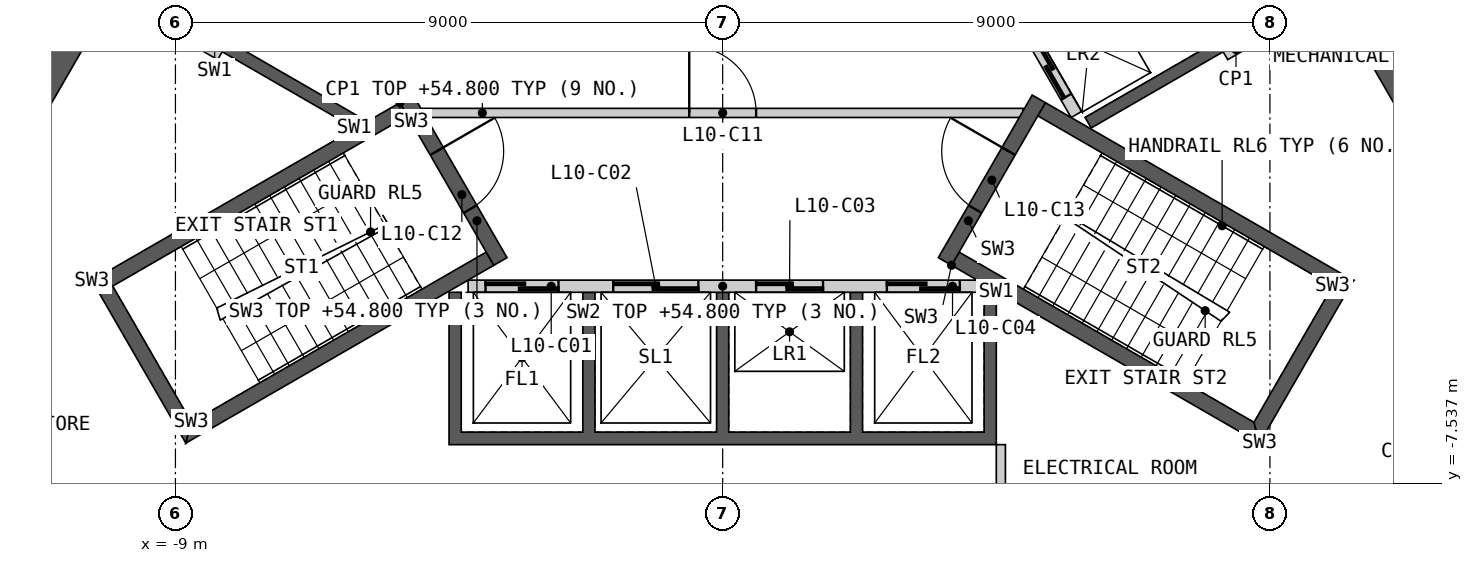
"""IFC4 building model, lengths in metres.
Left out: names, types, materials, properties, quantities, classifications, styles, units other than length and angle.
Written with IfcOpenShell. Run it as: python <this file> out.ifc"""

import sys

from ifc_helpers import new_model, si_unit, direction, frame, frame_2d, origin, place, context, subcontext, project, spatial, polyline, rectangle, outline, extrude, element, fill, save


model = new_model("IFC4")
c1 = context("Model", 3, precision=1e-05, world=origin(), true_north=direction((0.0, 1.0)))
c2 = subcontext(c1, "Body", "Model", "MODEL_VIEW")
j1 = project(units=[si_unit("LENGTHUNIT", "METRE"), si_unit("PLANEANGLEUNIT", "RADIAN")], contexts=[c1])
p1 = place(None, origin())
s1 = spatial("IfcSite", under=j1, at=p1, CompositionType="ELEMENT")
p2 = place(p1, origin())
s2 = spatial("IfcBuilding", under=s1, at=p2, CompositionType="ELEMENT")
p3 = place(p2, frame((0.0, 0.0, 51.0)))
s3 = spatial("IfcBuildingStorey", under=s2, at=p3, CompositionType="ELEMENT", Elevation=51.0)
p4 = place(p3, origin())
e1 = element("IfcWall", 1, at=p4, inside=s3, PredefinedType="SHEAR", context=c2, shape_type="SweptSolid", body=[
    extrude(outline(polyline([(4.5, -4.4), (4.5, -6.906), (-4.5, -6.906), (-4.5, -4.4), (-4.3, -4.4), (-4.3, -6.7), (-2.3, -6.7), (-2.3, -4.4), (-2.1, -4.4), (-2.1, -6.7), (-0.1, -6.7), (-0.1, -4.4), (0.1, -4.4), (0.1, -6.7), (2.1, -6.7), (2.1, -4.4), (2.3, -4.4), (2.3, -6.7), (4.3, -6.7), (4.3, -4.4), (4.5, -4.4)])), origin(), (0.0, 0.0, 1.0), 3.8),
])
p5 = place(p3, frame((-4.187, -4.3, 0.0), z_axis=(0.0, 0.0, 1.0), x_axis=(1.0, 0.0, 0.0)))
e2 = element("IfcWall", 2, at=p5, inside=s3, PredefinedType="SOLIDWALL", context=c2, shape_type="SweptSolid", body=[
    extrude(rectangle(XDim=8.373, YDim=0.2, at=frame_2d((4.187, 0.0))), origin(), (0.0, 0.0, 1.0), 3.8),
])
p6 = place(p5, frame((0.287, 0.0, 0.0)))
e3 = element("IfcOpeningElement", 3, at=p6, cuts=e2, PredefinedType="OPENING", context=c2, shape_type="SweptSolid", body=[
    extrude(rectangle(XDim=1.2, YDim=2.1, at=frame_2d((0.6, 1.05))), frame((0.0, 0.11, 0.0), z_axis=(0.0, -1.0, 0.0), x_axis=(1.0, 0.0, 0.0)), (0.0, 0.0, 1.0), 0.22),
])
p7 = place(p5, frame((2.387, 0.0, 0.0)))
e4 = element("IfcOpeningElement", 4, at=p7, cuts=e2, PredefinedType="OPENING", context=c2, shape_type="SweptSolid", body=[
    extrude(rectangle(XDim=1.4, YDim=2.1, at=frame_2d((0.7, 1.05))), frame((0.0, 0.11, 0.0), z_axis=(0.0, -1.0, 0.0), x_axis=(1.0, 0.0, 0.0)), (0.0, 0.0, 1.0), 0.22),
])
p8 = place(p5, frame((4.737, 0.0, 0.0)))
e5 = element("IfcOpeningElement", 5, at=p8, cuts=e2, PredefinedType="OPENING", context=c2, shape_type="SweptSolid", body=[
    extrude(rectangle(XDim=1.1, YDim=2.1, at=frame_2d((0.55, 1.05))), frame((0.0, 0.11, 0.0), z_axis=(0.0, -1.0, 0.0), x_axis=(1.0, 0.0, 0.0)), (0.0, 0.0, 1.0), 0.22),
])
p9 = place(p5, frame((6.887, 0.0, 0.0)))
e6 = element("IfcOpeningElement", 6, at=p9, cuts=e2, PredefinedType="OPENING", context=c2, shape_type="SweptSolid", body=[
    extrude(rectangle(XDim=1.2, YDim=2.1, at=frame_2d((0.6, 1.05))), frame((0.0, 0.11, 0.0), z_axis=(0.0, -1.0, 0.0), x_axis=(1.0, 0.0, 0.0)), (0.0, 0.0, 1.0), 0.22),
])
p10 = place(p3, origin())
e7 = element("IfcWall", 7, at=p10, inside=s3, PredefinedType="SHEAR", context=c2, shape_type="SweptSolid", body=[
    extrude(outline(polyline([(2.66, 4.192), (4.831, 5.445), (8.231, -0.444), (6.061, -1.697), (5.96, -1.524), (7.952, -0.374), (6.952, 1.358), (4.96, 0.208), (4.861, 0.381), (6.852, 1.531), (5.852, 3.263), (3.861, 2.113), (3.76, 2.287), (5.752, 3.437), (4.752, 5.169), (2.76, 4.019), (2.66, 4.192)])), origin(), (0.0, 0.0, 1.0), 3.8),
])
p11 = place(p3, frame((5.817, -1.476, 0.0), z_axis=(0.0, 0.0, 1.0), x_axis=(-0.500002616675, 0.866023893041, 0.0)))
e8 = element("IfcWall", 8, at=p11, inside=s3, PredefinedType="SOLIDWALL", context=c2, shape_type="SweptSolid", body=[
    extrude(rectangle(XDim=8.373, YDim=0.2, at=frame_2d((4.187, 0.0))), origin(), (0.0, 0.0, 1.0), 3.8),
])
p12 = place(p11, frame((0.337, 0.0, 0.0)))
e9 = element("IfcOpeningElement", 9, at=p12, cuts=e8, PredefinedType="OPENING", context=c2, shape_type="SweptSolid", body=[
    extrude(rectangle(XDim=1.1, YDim=2.1, at=frame_2d((0.55, 1.05))), frame((0.0, 0.11, 0.0), z_axis=(0.0, -1.0, 0.0), x_axis=(1.0, 0.0, 0.0)), (0.0, 0.0, 1.0), 0.22),
])
p13 = place(p11, frame((2.537, 0.0, 0.0)))
e10 = element("IfcOpeningElement", 10, at=p13, cuts=e8, PredefinedType="OPENING", context=c2, shape_type="SweptSolid", body=[
    extrude(rectangle(XDim=1.1, YDim=2.1, at=frame_2d((0.55, 1.05))), frame((0.0, 0.11, 0.0), z_axis=(0.0, -1.0, 0.0), x_axis=(1.0, 0.0, 0.0)), (0.0, 0.0, 1.0), 0.22),
])
p14 = place(p11, frame((4.737, 0.0, 0.0)))
e11 = element("IfcOpeningElement", 11, at=p14, cuts=e8, PredefinedType="OPENING", context=c2, shape_type="SweptSolid", body=[
    extrude(rectangle(XDim=1.1, YDim=2.1, at=frame_2d((0.55, 1.05))), frame((0.0, 0.11, 0.0), z_axis=(0.0, -1.0, 0.0), x_axis=(1.0, 0.0, 0.0)), (0.0, 0.0, 1.0), 0.22),
])
p15 = place(p11, frame((7.037, 0.0, 0.0)))
e12 = element("IfcOpeningElement", 12, at=p15, cuts=e8, PredefinedType="OPENING", context=c2, shape_type="SweptSolid", body=[
    extrude(rectangle(XDim=0.9, YDim=2.1, at=frame_2d((0.45, 1.05))), frame((0.0, 0.11, 0.0), z_axis=(0.0, -1.0, 0.0), x_axis=(1.0, 0.0, 0.0)), (0.0, 0.0, 1.0), 0.22),
])
p16 = place(p3, origin())
e13 = element("IfcWall", 13, at=p16, inside=s3, PredefinedType="SHEAR", context=c2, shape_type="SweptSolid", body=[
    extrude(outline(polyline([(-6.061, -1.697), (-8.231, -0.444), (-8.131, -0.271), (-5.96, -1.524), (-6.061, -1.697)])), origin(), (0.0, 0.0, 1.0), 3.8),
])
p17 = place(p3, frame((-4.941, -1.45, 0.0), z_axis=(0.0, 0.0, 1.0), x_axis=(1.0, 0.0, 0.0)))
e14 = element("IfcWall", 14, at=p17, inside=s3, PredefinedType="PARTITIONING", context=c2, shape_type="SweptSolid", body=[
    extrude(rectangle(XDim=9.882, YDim=0.15, at=frame_2d((4.941, 0.0))), origin(), (0.0, 0.0, 1.0), 3.8),
])
p18 = place(p17, frame((4.391, 0.0, 0.0)))
e15 = element("IfcOpeningElement", 15, at=p18, cuts=e14, PredefinedType="OPENING", context=c2, shape_type="SweptSolid", body=[
    extrude(rectangle(XDim=1.1, YDim=2.1, at=frame_2d((0.55, 1.05))), frame((0.0, 0.085, 0.0), z_axis=(0.0, -1.0, 0.0), x_axis=(1.0, 0.0, 0.0)), (0.0, 0.0, 1.0), 0.17),
])
p19 = place(p3, origin())
e16 = element("IfcWall", 16, at=p19, inside=s3, PredefinedType="SHEAR", context=c2, shape_type="SweptSolid", body=[
    extrude(outline(polyline([(-5.307, -1.281), (-10.374, -4.206), (-10.032, -4.298), (-5.182, -1.498), (-5.307, -1.281)])), origin(), (0.0, 0.0, 1.0), 3.8),
])
p20 = place(p3, origin())
e17 = element("IfcWall", 17, at=p20, inside=s3, PredefinedType="SHEAR", context=c2, shape_type="SweptSolid", body=[
    extrude(outline(polyline([(-10.374, -4.206), (-8.83, -6.881), (-8.738, -6.539), (-10.032, -4.298), (-10.374, -4.206)])), origin(), (0.0, 0.0, 1.0), 3.8),
])
p21 = place(p3, origin())
e18 = element("IfcWall", 18, at=p21, inside=s3, PredefinedType="SHEAR", context=c2, shape_type="SweptSolid", body=[
    extrude(outline(polyline([(-8.738, -6.539), (-8.83, -6.881), (-3.763, -3.956), (-3.888, -3.739), (-8.738, -6.539)])), origin(), (0.0, 0.0, 1.0), 3.8),
])
p22 = place(p3, frame((-5.199, -1.219, 0.0), z_axis=(0.0, 0.0, 1.0), x_axis=(0.499982516597, -0.866035497597, 0.0)))
e19 = element("IfcWall", 19, at=p22, inside=s3, PredefinedType="SHEAR", context=c2, shape_type="SweptSolid", body=[
    extrude(rectangle(XDim=3.088, YDim=0.25, at=frame_2d((1.544, 0.0))), origin(), (0.0, 0.0, 1.0), 3.8),
])
p23 = place(p22, frame((0.994, 0.0, 0.0)))
e20 = element("IfcOpeningElement", 20, at=p23, cuts=e19, PredefinedType="OPENING", context=c2, shape_type="SweptSolid", body=[
    extrude(rectangle(XDim=1.1, YDim=2.1, at=frame_2d((0.55, 1.05))), frame((0.0, 0.135, 0.0), z_axis=(0.0, -1.0, 0.0), x_axis=(1.0, 0.0, 0.0)), (0.0, 0.0, 1.0), 0.27),
])
p24 = place(p3, origin())
e21 = element("IfcWall", 21, at=p24, inside=s3, PredefinedType="SHEAR", context=c2, shape_type="SweptSolid", body=[
    extrude(outline(polyline([(3.763, -3.956), (8.83, -6.881), (8.738, -6.539), (3.888, -3.739), (3.763, -3.956)])), origin(), (0.0, 0.0, 1.0), 3.8),
])
p25 = place(p3, origin())
e22 = element("IfcWall", 22, at=p25, inside=s3, PredefinedType="SHEAR", context=c2, shape_type="SweptSolid", body=[
    extrude(outline(polyline([(8.83, -6.881), (10.374, -4.206), (10.032, -4.298), (8.738, -6.539), (8.83, -6.881)])), origin(), (0.0, 0.0, 1.0), 3.8),
])
p26 = place(p3, origin())
e23 = element("IfcWall", 23, at=p26, inside=s3, PredefinedType="SHEAR", context=c2, shape_type="SweptSolid", body=[
    extrude(outline(polyline([(10.032, -4.298), (10.374, -4.206), (5.307, -1.281), (5.182, -1.498), (10.032, -4.298)])), origin(), (0.0, 0.0, 1.0), 3.8),
])
p27 = place(p3, frame((3.655, -3.893, 0.0), z_axis=(0.0, 0.0, 1.0), x_axis=(0.499982516597, 0.866035497597, 0.0)))
e24 = element("IfcWall", 24, at=p27, inside=s3, PredefinedType="SHEAR", context=c2, shape_type="SweptSolid", body=[
    extrude(rectangle(XDim=3.088, YDim=0.25, at=frame_2d((1.544, 0.0))), origin(), (0.0, 0.0, 1.0), 3.8),
])
p28 = place(p27, frame((0.994, 0.0, 0.0)))
e25 = element("IfcOpeningElement", 25, at=p28, cuts=e24, PredefinedType="OPENING", context=c2, shape_type="SweptSolid", body=[
    extrude(rectangle(XDim=1.1, YDim=2.1, at=frame_2d((0.55, 1.05))), frame((0.0, 0.135, 0.0), z_axis=(0.0, -1.0, 0.0), x_axis=(1.0, 0.0, 0.0)), (0.0, 0.0, 1.0), 0.27),
])
p29 = place(p3, frame((-8.268, -0.509, 0.0), z_axis=(0.0, 0.0, 1.0), x_axis=(-0.866035824272, 0.499981950752, 0.0)))
e26 = element("IfcWall", 26, at=p29, inside=s3, PredefinedType="PARTITIONING", context=c2, shape_type="SweptSolid", body=[
    extrude(rectangle(XDim=2.009, YDim=0.15, at=frame_2d((1.004, 0.0))), origin(), (0.0, 0.0, 1.0), 3.8),
])
p30 = place(p3, frame((4.575, -6.906, 0.0), z_axis=(0.0, 0.0, 1.0), x_axis=(0.0, -1.0, 0.0)))
e27 = element("IfcWall", 27, at=p30, inside=s3, PredefinedType="PARTITIONING", context=c2, shape_type="SweptSolid", body=[
    extrude(rectangle(XDim=2.009, YDim=0.15, at=frame_2d((1.004, 0.0))), origin(), (0.0, 0.0, 1.0), 3.8),
])
p31 = place(p3, frame((8.268, -0.509, 0.0), z_axis=(0.0, 0.0, 1.0), x_axis=(0.866035824272, 0.499981950752, 0.0)))
e28 = element("IfcWall", 28, at=p31, inside=s3, PredefinedType="PARTITIONING", context=c2, shape_type="SweptSolid", body=[
    extrude(rectangle(XDim=2.009, YDim=0.15, at=frame_2d((1.004, 0.0))), origin(), (0.0, 0.0, 1.0), 3.8),
])
p32 = place(p3, frame((13.823, -6.111, 0.0), z_axis=(0.0, 0.0, 1.0), x_axis=(-0.866026802741, -0.499997576928, 0.0)))
e29 = element("IfcWall", 29, at=p32, inside=s3, PredefinedType="PARTITIONING", context=c2, shape_type="SweptSolid", body=[
    extrude(rectangle(XDim=5.607, YDim=0.15, at=frame_2d((2.804, 0.0))), origin(), (0.0, 0.0, 1.0), 3.8),
])
p33 = place(p3, frame((11.755, -1.63, 0.0), z_axis=(0.0, 0.0, 1.0), x_axis=(-0.499943114462, 0.866058244174, 0.0)))
e30 = element("IfcWall", 30, at=p33, inside=s3, PredefinedType="SHEAR", context=c2, shape_type="SweptSolid", body=[
    extrude(rectangle(XDim=2.809, YDim=0.9, at=frame_2d((1.405, 0.0))), origin(), (0.0, 0.0, 1.0), 3.8),
])
p34 = place(p3, frame((-10.31, 0.872, 0.0), z_axis=(0.0, 0.0, 1.0), x_axis=(-0.499991697393, -0.866030197244, 0.0)))
e31 = element("IfcWall", 31, at=p34, inside=s3, PredefinedType="SHEAR", context=c2, shape_type="SweptSolid", body=[
    extrude(rectangle(XDim=11.041, YDim=0.9, at=frame_2d((5.521, 0.0))), origin(), (0.0, 0.0, 1.0), 3.8),
])
p35 = place(p3, frame((10.719, 5.865, 0.0), z_axis=(0.0, 0.0, 1.0), x_axis=(0.49999175339, -0.866030164915, 0.0)))
e32 = element("IfcWall", 32, at=p35, inside=s3, PredefinedType="PARTITIONING", context=c2, shape_type="SweptSolid", body=[
    extrude(rectangle(XDim=10.019, YDim=0.2, at=frame_2d((5.009, 0.0))), origin(), (0.0, 0.0, 1.0), 3.8),
])
p36 = place(p35, frame((6.464, 0.0, 0.0)))
e33 = element("IfcOpeningElement", 33, at=p36, cuts=e32, PredefinedType="OPENING", context=c2, shape_type="SweptSolid", body=[
    extrude(rectangle(XDim=1.0, YDim=2.1, at=frame_2d((0.5, 1.05))), frame((0.0, 0.11, 0.0), z_axis=(0.0, -1.0, 0.0), x_axis=(1.0, 0.0, 0.0)), (0.0, 0.0, 1.0), 0.22),
])
p37 = place(p35, frame((1.753, 0.0, 0.0)))
e34 = element("IfcOpeningElement", 34, at=p37, cuts=e32, PredefinedType="OPENING", context=c2, shape_type="SweptSolid", body=[
    extrude(rectangle(XDim=1.0, YDim=2.1, at=frame_2d((0.5, 1.05))), frame((0.0, 0.11, 0.0), z_axis=(0.0, -1.0, 0.0), x_axis=(1.0, 0.0, 0.0)), (0.0, 0.0, 1.0), 0.22),
])
p38 = place(p3, frame((-15.728, -2.811, 0.0), z_axis=(0.0, 0.0, 1.0), x_axis=(0.49999175339, 0.866030164915, 0.0)))
e35 = element("IfcWall", 35, at=p38, inside=s3, PredefinedType="PARTITIONING", context=c2, shape_type="SweptSolid", body=[
    extrude(rectangle(XDim=10.019, YDim=0.2, at=frame_2d((5.009, 0.0))), origin(), (0.0, 0.0, 1.0), 3.8),
])
p39 = place(p38, frame((4.059, 0.0, 0.0)))
e36 = element("IfcOpeningElement", 36, at=p39, cuts=e35, PredefinedType="OPENING", context=c2, shape_type="SweptSolid", body=[
    extrude(rectangle(XDim=1.8, YDim=2.1, at=frame_2d((0.9, 1.05))), frame((0.0, 0.11, 0.0), z_axis=(0.0, -1.0, 0.0), x_axis=(1.0, 0.0, 0.0)), (0.0, 0.0, 1.0), 0.22),
])
p40 = place(p6, origin())
e37 = element("IfcDoor", 37, at=p40, inside=s3, OperationType="SLIDING_TO_LEFT", PredefinedType="DOOR", context=c2, shape_type="SweptSolid", body=[
    extrude(rectangle(XDim=1.2, YDim=2.1, at=frame_2d((0.6, 1.05))), frame((0.0, 0.025, 0.0), z_axis=(0.0, -1.0, 0.0), x_axis=(1.0, 0.0, 0.0)), (0.0, 0.0, 1.0), 0.05),
])
fill(e3, e37)
p41 = place(p7, origin())
e38 = element("IfcDoor", 38, at=p41, inside=s3, OperationType="SLIDING_TO_LEFT", PredefinedType="DOOR", context=c2, shape_type="SweptSolid", body=[
    extrude(rectangle(XDim=1.4, YDim=2.1, at=frame_2d((0.7, 1.05))), frame((0.0, 0.025, 0.0), z_axis=(0.0, -1.0, 0.0), x_axis=(1.0, 0.0, 0.0)), (0.0, 0.0, 1.0), 0.05),
])
fill(e4, e38)
p42 = place(p8, origin())
e39 = element("IfcDoor", 39, at=p42, inside=s3, OperationType="SLIDING_TO_LEFT", PredefinedType="DOOR", context=c2, shape_type="SweptSolid", body=[
    extrude(rectangle(XDim=1.1, YDim=2.1, at=frame_2d((0.55, 1.05))), frame((0.0, 0.025, 0.0), z_axis=(0.0, -1.0, 0.0), x_axis=(1.0, 0.0, 0.0)), (0.0, 0.0, 1.0), 0.05),
])
fill(e5, e39)
p43 = place(p9, origin())
e40 = element("IfcDoor", 40, at=p43, inside=s3, OperationType="SLIDING_TO_LEFT", PredefinedType="DOOR", context=c2, shape_type="SweptSolid", body=[
    extrude(rectangle(XDim=1.2, YDim=2.1, at=frame_2d((0.6, 1.05))), frame((0.0, 0.025, 0.0), z_axis=(0.0, -1.0, 0.0), x_axis=(1.0, 0.0, 0.0)), (0.0, 0.0, 1.0), 0.05),
])
fill(e6, e40)
p44 = place(p12, origin())
e41 = element("IfcDoor", 41, at=p44, inside=s3, OperationType="SLIDING_TO_LEFT", PredefinedType="DOOR", context=c2, shape_type="SweptSolid", body=[
    extrude(rectangle(XDim=1.1, YDim=2.1, at=frame_2d((0.55, 1.05))), frame((0.0, 0.025, 0.0), z_axis=(0.0, -1.0, 0.0), x_axis=(1.0, 0.0, 0.0)), (0.0, 0.0, 1.0), 0.05),
])
fill(e9, e41)
p45 = place(p18, origin())
e42 = element("IfcDoor", 42, at=p45, inside=s3, OperationType="SINGLE_SWING_LEFT", PredefinedType="DOOR", context=c2, shape_type="SweptSolid", body=[
    extrude(rectangle(XDim=1.1, YDim=2.1, at=frame_2d((0.55, 1.05))), frame((0.0, 0.025, 0.0), z_axis=(0.0, -1.0, 0.0), x_axis=(1.0, 0.0, 0.0)), (0.0, 0.0, 1.0), 0.05),
])
fill(e15, e42)
p46 = place(p23, origin())
e43 = element("IfcDoor", 43, at=p46, inside=s3, OperationType="SINGLE_SWING_LEFT", PredefinedType="DOOR", context=c2, shape_type="SweptSolid", body=[
    extrude(rectangle(XDim=1.1, YDim=2.1, at=frame_2d((0.55, 1.05))), frame((0.0, 0.025, 0.0), z_axis=(0.0, -1.0, 0.0), x_axis=(1.0, 0.0, 0.0)), (0.0, 0.0, 1.0), 0.05),
])
fill(e20, e43)
p47 = place(p28, origin())
e44 = element("IfcDoor", 44, at=p47, inside=s3, OperationType="SINGLE_SWING_RIGHT", PredefinedType="DOOR", context=c2, shape_type="SweptSolid", body=[
    extrude(rectangle(XDim=1.1, YDim=2.1, at=frame_2d((0.55, 1.05))), frame((0.0, 0.025, 0.0), z_axis=(0.0, -1.0, 0.0), x_axis=(1.0, 0.0, 0.0)), (0.0, 0.0, 1.0), 0.05),
])
fill(e25, e44)
save(model, sys.argv[1])
